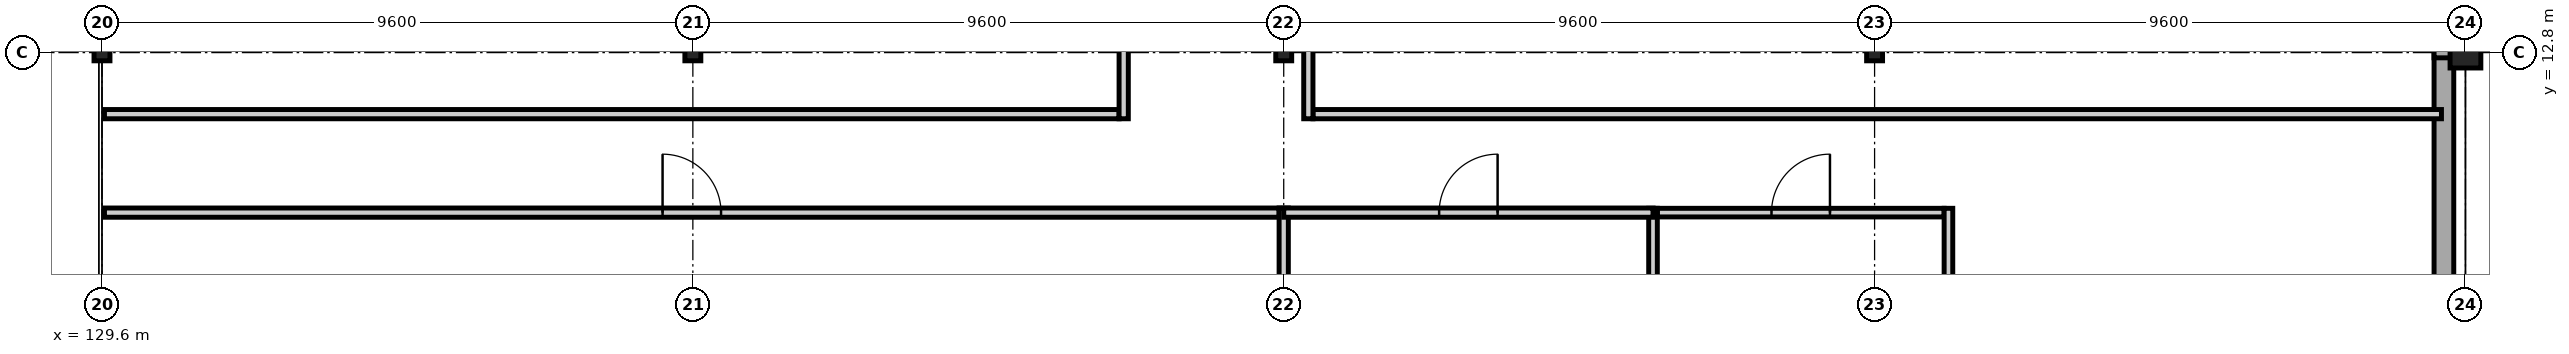
"""IFC4 building model, lengths in metres.
Left out: names, types, materials, properties, quantities, classifications, styles, units other than length and angle.
Written with IfcOpenShell. Run it as: python <this file> out.ifc"""

import sys

from ifc_helpers import new_model, si_unit, direction, frame, frame_2d, origin, origin_2d, place, context, subcontext, project, spatial, rectangle, i_section, extrude, element, fill, save


model = new_model("IFC4")
c1 = context("Model", 3, precision=1e-05, world=origin(), true_north=direction((0.0, 1.0)))
c2 = subcontext(c1, "Body", "Model", "MODEL_VIEW")
j1 = project(units=[si_unit("LENGTHUNIT", "METRE"), si_unit("PLANEANGLEUNIT", "RADIAN")], contexts=[c1])
p1 = place(None, origin())
s1 = spatial("IfcSite", under=j1, at=p1, CompositionType="ELEMENT")
p2 = place(p1, origin())
s2 = spatial("IfcBuilding", under=s1, at=p2, CompositionType="ELEMENT")
p3 = place(p2, frame((0.0, 0.0, 5.1)))
s3 = spatial("IfcBuildingStorey", under=s2, at=p3, CompositionType="ELEMENT", Elevation=5.1)
for number, where, z_axis, x_axis in (
    (1, (129.6, 12.8, 0.0), (0.0, 0.0, 1.0), (1.0, 0.0, 0.0)),
    (2, (139.2, 12.8, 0.0), (0.0, 0.0, 1.0), (1.0, 0.0, 0.0)),
    (3, (148.8, 12.8, 0.0), (0.0, 0.0, 1.0), (1.0, 0.0, 0.0)),
    (4, (158.4, 12.8, 0.0), (0.0, 0.0, 1.0), (1.0, 0.0, 0.0)),
):
    element("IfcColumn", number, at=place(p3, frame(where, z_axis=z_axis, x_axis=x_axis)), inside=s3, PredefinedType="COLUMN", context=c2, shape_type="SweptSolid", body=[
        extrude(i_section(OverallWidth=0.259, OverallDepth=0.267, WebThickness=0.013, FlangeThickness=0.021, at=origin_2d()), origin(), (0.0, 0.0, 1.0), 4.5),
    ])
p4 = place(p3, frame((168.0, 12.8, 0.0), z_axis=(0.0, 0.0, 1.0), x_axis=(1.0, 0.0, 0.0)))
e5 = element("IfcColumn", 5, at=p4, inside=s3, PredefinedType="COLUMN", context=c2, shape_type="SweptSolid", body=[
    extrude(rectangle(XDim=0.5, YDim=0.5, at=origin_2d()), origin(), (0.0, 0.0, 1.0), 4.5),
])
for number, where, z_axis, x_axis in (
    (6, (167.65, 12.885, 0.0), (0.0, 0.0, 1.0), (0.0, -1.0, 0.0)),
    (7, (167.65, 20.885, 0.0), (0.0, 0.0, 1.0), (0.0, -1.0, 0.0)),
):
    element("IfcWall", number, at=place(p3, frame(where, z_axis=z_axis, x_axis=x_axis)), inside=s3, PredefinedType="SOLIDWALL", context=c2, shape_type="SweptSolid", body=[
        extrude(rectangle(XDim=8.17, YDim=0.32, at=frame_2d((4.085, 0.0))), origin(), (0.0, 0.0, 1.0), 3.91),
    ])
p5 = place(p3, frame((154.87, 10.2, 0.0), z_axis=(0.0, 0.0, 1.0), x_axis=(1.0, 0.0, 0.0)))
e8 = element("IfcWall", 8, at=p5, inside=s3, PredefinedType="PARTITIONING", context=c2, shape_type="SweptSolid", body=[
    extrude(rectangle(XDim=4.66, YDim=0.14, at=frame_2d((2.33, 0.0))), origin(), (0.0, 0.0, 1.0), 3.91),
])
p6 = place(p5, frame((1.855, 0.0, 0.0)))
e9 = element("IfcOpeningElement", 9, at=p6, cuts=e8, PredefinedType="OPENING", context=c2, shape_type="SweptSolid", body=[
    extrude(rectangle(XDim=0.95, YDim=2.1, at=frame_2d((0.475, 1.05))), frame((0.0, 0.08, 0.0), z_axis=(0.0, -1.0, 0.0), x_axis=(1.0, 0.0, 0.0)), (0.0, 0.0, 1.0), 0.16),
])
for number, where, z_axis, x_axis in (
    (10, (154.8, 4.84, 0.0), (0.0, 0.0, 1.0), (0.0, 1.0, 0.0)),
    (11, (159.6, 4.84, 0.0), (0.0, 0.0, 1.0), (0.0, 1.0, 0.0)),
):
    element("IfcWall", number, at=place(p3, frame(where, z_axis=z_axis, x_axis=x_axis)), inside=s3, PredefinedType="PARTITIONING", context=c2, shape_type="SweptSolid", body=[
        extrude(rectangle(XDim=5.43, YDim=0.14, at=frame_2d((2.715, 0.0))), origin(), (0.0, 0.0, 1.0), 3.945),
    ])
p7 = place(p3, frame((129.64, 10.2, 0.0), z_axis=(0.0, 0.0, 1.0), x_axis=(1.0, 0.0, 0.0)))
e12 = element("IfcWall", 12, at=p7, inside=s3, PredefinedType="PARTITIONING", context=c2, shape_type="SweptSolid", body=[
    extrude(rectangle(XDim=19.085, YDim=0.15, at=frame_2d((9.542, 0.0))), origin(), (0.0, 0.0, 1.0), 3.91),
])
p8 = place(p7, frame((9.068, 0.0, 0.0)))
e13 = element("IfcOpeningElement", 13, at=p8, cuts=e12, PredefinedType="OPENING", context=c2, shape_type="SweptSolid", body=[
    extrude(rectangle(XDim=0.95, YDim=2.15, at=frame_2d((0.475, 1.075))), frame((0.0, 0.085, 0.0), z_axis=(0.0, -1.0, 0.0), x_axis=(1.0, 0.0, 0.0)), (0.0, 0.0, 1.0), 0.17),
])
p9 = place(p3, frame((148.8, 4.84, 0.0), z_axis=(0.0, 0.0, 1.0), x_axis=(0.0, 1.0, 0.0)))
e14 = element("IfcWall", 14, at=p9, inside=s3, PredefinedType="PARTITIONING", context=c2, shape_type="SweptSolid", body=[
    extrude(rectangle(XDim=5.435, YDim=0.15, at=frame_2d((2.717, 0.0))), origin(), (0.0, 0.0, 1.0), 3.91),
])
p10 = place(p3, frame((148.8, 10.2, 0.0), z_axis=(0.0, 0.0, 1.0), x_axis=(1.0, 0.0, 0.0)))
e15 = element("IfcWall", 15, at=p10, inside=s3, PredefinedType="PARTITIONING", context=c2, shape_type="SweptSolid", body=[
    extrude(rectangle(XDim=6.0, YDim=0.15, at=frame_2d((3.0, 0.0))), origin(), (0.0, 0.0, 1.0), 3.91),
])
p11 = place(p10, frame((2.525, 0.0, 0.0)))
e16 = element("IfcOpeningElement", 16, at=p11, cuts=e15, PredefinedType="OPENING", context=c2, shape_type="SweptSolid", body=[
    extrude(rectangle(XDim=0.95, YDim=2.15, at=frame_2d((0.475, 1.075))), frame((0.0, 0.085, 0.0), z_axis=(0.0, -1.0, 0.0), x_axis=(1.0, 0.0, 0.0)), (0.0, 0.0, 1.0), 0.17),
])
p12 = place(p3, frame((129.64, 11.8, 0.0), z_axis=(0.0, 0.0, 1.0), x_axis=(1.0, 0.0, 0.0)))
e17 = element("IfcWall", 17, at=p12, inside=s3, PredefinedType="PARTITIONING", context=c2, shape_type="SweptSolid", body=[
    extrude(rectangle(XDim=16.485, YDim=0.15, at=frame_2d((8.243, 0.0))), origin(), (0.0, 0.0, 1.0), 3.91),
])
p13 = place(p3, frame((146.2, 11.725, 0.0), z_axis=(0.0, 0.0, 1.0), x_axis=(0.0, 1.0, 0.0)))
e18 = element("IfcWall", 18, at=p13, inside=s3, PredefinedType="PARTITIONING", context=c2, shape_type="SweptSolid", body=[
    extrude(rectangle(XDim=33.035, YDim=0.15, at=frame_2d((16.518, 0.0))), origin(), (0.0, 0.0, 1.0), 3.945),
])
p14 = place(p13, frame((15.717, 0.0, 0.0)))
e19 = element("IfcOpeningElement", 19, at=p14, cuts=e18, PredefinedType="OPENING", context=c2, shape_type="SweptSolid", body=[
    extrude(rectangle(XDim=1.6, YDim=2.25, at=frame_2d((0.8, 1.125))), frame((0.0, 0.085, 0.0), z_axis=(0.0, -1.0, 0.0), x_axis=(1.0, 0.0, 0.0)), (0.0, 0.0, 1.0), 0.17),
])
p15 = place(p3, frame((149.275, 11.8, 0.0), z_axis=(0.0, 0.0, 1.0), x_axis=(1.0, 0.0, 0.0)))
e20 = element("IfcWall", 20, at=p15, inside=s3, PredefinedType="PARTITIONING", context=c2, shape_type="SweptSolid", body=[
    extrude(rectangle(XDim=18.335, YDim=0.15, at=frame_2d((9.167, 0.0))), origin(), (0.0, 0.0, 1.0), 3.91),
])
p16 = place(p3, frame((149.2, 11.725, 0.0), z_axis=(0.0, 0.0, 1.0), x_axis=(0.0, 1.0, 0.0)))
e21 = element("IfcWall", 21, at=p16, inside=s3, PredefinedType="PARTITIONING", context=c2, shape_type="SweptSolid", body=[
    extrude(rectangle(XDim=18.75, YDim=0.15, at=frame_2d((9.375, 0.0))), origin(), (0.0, 0.0, 1.0), 3.945),
])
p17 = place(p16, frame((10.4, 0.0, 0.0)))
e22 = element("IfcOpeningElement", 22, at=p17, cuts=e21, PredefinedType="OPENING", context=c2, shape_type="SweptSolid", body=[
    extrude(rectangle(XDim=0.95, YDim=2.15, at=frame_2d((0.475, 1.075))), frame((0.0, 0.085, 0.0), z_axis=(0.0, -1.0, 0.0), x_axis=(1.0, 0.0, 0.0)), (0.0, 0.0, 1.0), 0.17),
])
p18 = place(p6, origin())
e23 = element("IfcDoor", 23, at=p18, inside=s3, OperationType="SINGLE_SWING_RIGHT", PredefinedType="DOOR", context=c2, shape_type="SweptSolid", body=[
    extrude(rectangle(XDim=0.95, YDim=2.1, at=frame_2d((0.475, 1.05))), frame((0.0, 0.025, 0.0), z_axis=(0.0, -1.0, 0.0), x_axis=(1.0, 0.0, 0.0)), (0.0, 0.0, 1.0), 0.05),
])
fill(e9, e23)
p19 = place(p8, origin())
e24 = element("IfcDoor", 24, at=p19, inside=s3, OperationType="SINGLE_SWING_LEFT", PredefinedType="DOOR", context=c2, shape_type="SweptSolid", body=[
    extrude(rectangle(XDim=0.95, YDim=2.15, at=frame_2d((0.475, 1.075))), frame((0.0, 0.025, 0.0), z_axis=(0.0, -1.0, 0.0), x_axis=(1.0, 0.0, 0.0)), (0.0, 0.0, 1.0), 0.05),
])
fill(e13, e24)
p20 = place(p11, origin())
e25 = element("IfcDoor", 25, at=p20, inside=s3, OperationType="SINGLE_SWING_RIGHT", PredefinedType="DOOR", context=c2, shape_type="SweptSolid", body=[
    extrude(rectangle(XDim=0.95, YDim=2.15, at=frame_2d((0.475, 1.075))), frame((0.0, 0.025, 0.0), z_axis=(0.0, -1.0, 0.0), x_axis=(1.0, 0.0, 0.0)), (0.0, 0.0, 1.0), 0.05),
])
fill(e16, e25)
save(model, sys.argv[1])
